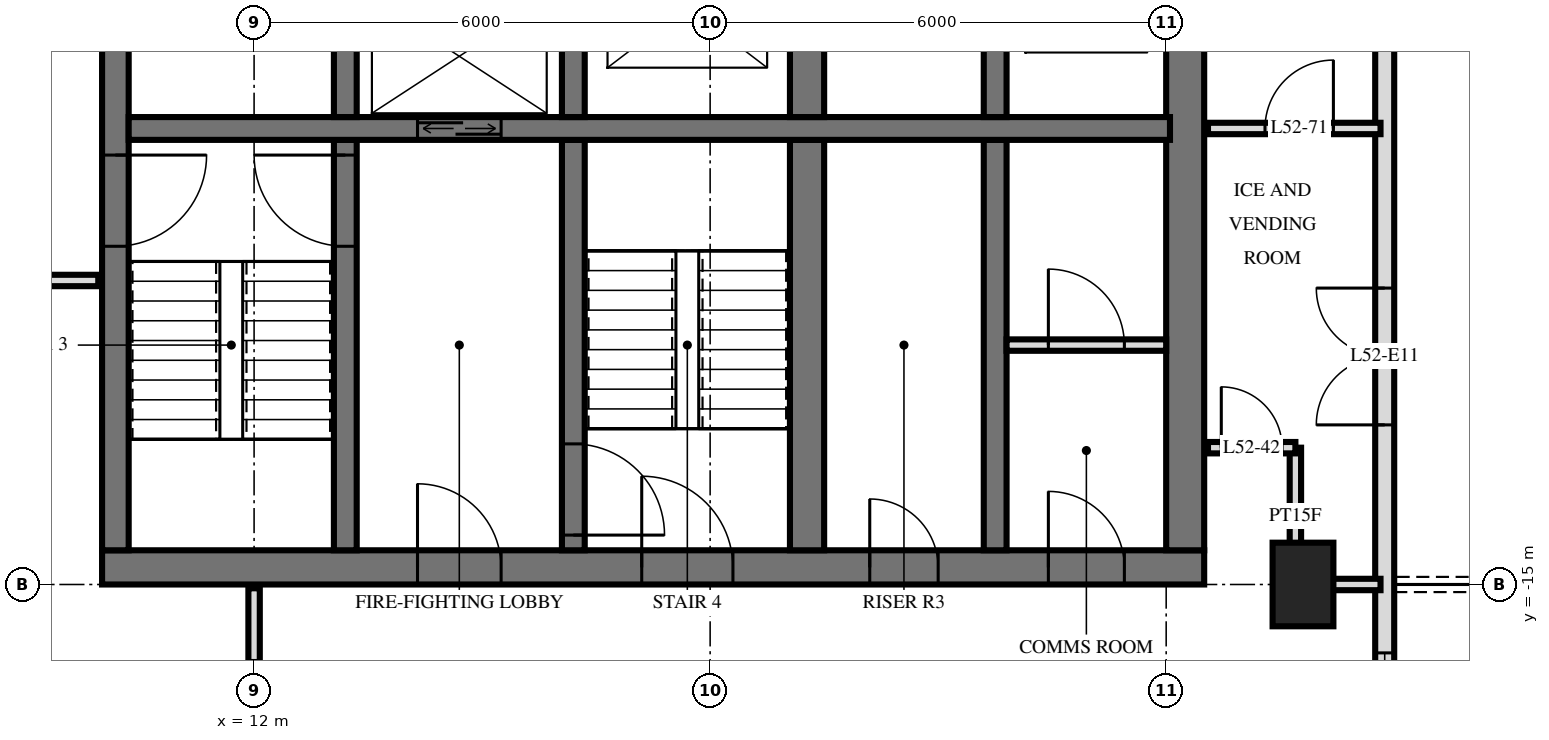
"""IFC4 building model, lengths in metres.
Left out: names, types, materials, properties, quantities, classifications, styles, units other than length and angle.
Written with IfcOpenShell. Run it as: python <this file> out.ifc"""

import sys

from ifc_helpers import new_model, si_unit, direction, frame, frame_2d, origin, origin_2d, place, context, subcontext, project, spatial, rectangle, extrude, element, fill, save


model = new_model("IFC4")
c1 = context("Model", 3, precision=1e-05, world=origin(), true_north=direction((0.0, 1.0)))
c2 = subcontext(c1, "Body", "Model", "MODEL_VIEW")
j1 = project(units=[si_unit("LENGTHUNIT", "METRE"), si_unit("PLANEANGLEUNIT", "RADIAN")], contexts=[c1])
p1 = place(None, origin())
s1 = spatial("IfcSite", under=j1, at=p1, CompositionType="ELEMENT")
p2 = place(p1, origin())
s2 = spatial("IfcBuilding", under=s1, at=p2, CompositionType="ELEMENT")
p3 = place(p2, frame((0.0, 0.0, 201.1)))
s3 = spatial("IfcBuildingStorey", under=s2, at=p3, CompositionType="ELEMENT", Elevation=201.1)
p4 = place(p3, frame((25.8, -15.0, 0.0), z_axis=(0.0, 0.0, 1.0), x_axis=(0.0, 1.0, 0.0)))
e1 = element("IfcColumn", 1, at=p4, inside=s3, PredefinedType="COLUMN", context=c2, shape_type="SweptSolid", body=[
    extrude(rectangle(XDim=1.1, YDim=0.8, at=origin_2d()), origin(), (0.0, 0.0, 1.0), 3.5),
])
p5 = place(p3, frame((10.0, -14.775, 0.0), z_axis=(0.0, 0.0, 1.0), x_axis=(1.0, 0.0, 0.0)))
e2 = element("IfcWall", 2, at=p5, inside=s3, PredefinedType="SHEAR", context=c2, shape_type="SweptSolid", body=[
    extrude(rectangle(XDim=14.5, YDim=0.45, at=frame_2d((7.25, 0.0))), origin(), (0.0, 0.0, 1.0), 3.5),
])
p6 = place(p5, frame((7.1, 0.0, 0.0)))
e3 = element("IfcOpeningElement", 3, at=p6, cuts=e2, PredefinedType="OPENING", context=c2, shape_type="SweptSolid", body=[
    extrude(rectangle(XDim=1.2, YDim=2.1, at=frame_2d((0.6, 1.05))), frame((0.0, 0.235, 0.0), z_axis=(0.0, -1.0, 0.0), x_axis=(1.0, 0.0, 0.0)), (0.0, 0.0, 1.0), 0.47),
])
p7 = place(p5, frame((4.15, 0.0, 0.0)))
e4 = element("IfcOpeningElement", 4, at=p7, cuts=e2, PredefinedType="OPENING", context=c2, shape_type="SweptSolid", body=[
    extrude(rectangle(XDim=1.1, YDim=2.1, at=frame_2d((0.55, 1.05))), frame((0.0, 0.235, 0.0), z_axis=(0.0, -1.0, 0.0), x_axis=(1.0, 0.0, 0.0)), (0.0, 0.0, 1.0), 0.47),
])
p8 = place(p5, frame((10.1, 0.0, 0.0)))
e5 = element("IfcOpeningElement", 5, at=p8, cuts=e2, PredefinedType="OPENING", context=c2, shape_type="SweptSolid", body=[
    extrude(rectangle(XDim=0.9, YDim=2.1, at=frame_2d((0.45, 1.05))), frame((0.0, 0.235, 0.0), z_axis=(0.0, -1.0, 0.0), x_axis=(1.0, 0.0, 0.0)), (0.0, 0.0, 1.0), 0.47),
])
p9 = place(p5, frame((12.45, 0.0, 0.0)))
e6 = element("IfcOpeningElement", 6, at=p9, cuts=e2, PredefinedType="OPENING", context=c2, shape_type="SweptSolid", body=[
    extrude(rectangle(XDim=1.0, YDim=2.1, at=frame_2d((0.5, 1.05))), frame((0.0, 0.235, 0.0), z_axis=(0.0, -1.0, 0.0), x_axis=(1.0, 0.0, 0.0)), (0.0, 0.0, 1.0), 0.47),
])
p10 = place(p3, frame((10.175, -14.55, 0.0), z_axis=(0.0, 0.0, 1.0), x_axis=(0.0, 1.0, 0.0)))
e7 = element("IfcWall", 7, at=p10, inside=s3, PredefinedType="SHEAR", context=c2, shape_type="SweptSolid", body=[
    extrude(rectangle(XDim=14.1, YDim=0.35, at=frame_2d((7.05, 0.0))), origin(), (0.0, 0.0, 1.0), 3.5),
])
p11 = place(p10, frame((8.4, 0.0, 0.0)))
e8 = element("IfcOpeningElement", 8, at=p11, cuts=e7, PredefinedType="OPENING", context=c2, shape_type="SweptSolid", body=[
    extrude(rectangle(XDim=1.4, YDim=2.4, at=frame_2d((0.7, 1.2))), frame((0.0, 0.185, 0.0), z_axis=(0.0, -1.0, 0.0), x_axis=(1.0, 0.0, 0.0)), (0.0, 0.0, 1.0), 0.37),
])
p12 = place(p10, frame((10.0, 0.0, 0.0)))
e9 = element("IfcOpeningElement", 9, at=p12, cuts=e7, PredefinedType="OPENING", context=c2, shape_type="SweptSolid", body=[
    extrude(rectangle(XDim=1.4, YDim=2.4, at=frame_2d((0.7, 1.2))), frame((0.0, 0.185, 0.0), z_axis=(0.0, -1.0, 0.0), x_axis=(1.0, 0.0, 0.0)), (0.0, 0.0, 1.0), 0.37),
])
p13 = place(p10, frame((4.0, 0.0, 0.0)))
e10 = element("IfcOpeningElement", 10, at=p13, cuts=e7, PredefinedType="OPENING", context=c2, shape_type="SweptSolid", body=[
    extrude(rectangle(XDim=1.2, YDim=2.1, at=frame_2d((0.6, 1.05))), frame((0.0, 0.185, 0.0), z_axis=(0.0, -1.0, 0.0), x_axis=(1.0, 0.0, 0.0)), (0.0, 0.0, 1.0), 0.37),
])
p14 = place(p3, frame((24.25, -14.55, 0.0), z_axis=(0.0, 0.0, 1.0), x_axis=(0.0, 1.0, 0.0)))
e11 = element("IfcWall", 11, at=p14, inside=s3, PredefinedType="SHEAR", context=c2, shape_type="SweptSolid", body=[
    extrude(rectangle(XDim=14.1, YDim=0.5, at=frame_2d((7.05, 0.0))), origin(), (0.0, 0.0, 1.0), 3.5),
])
p15 = place(p3, frame((10.35, -9.0, 0.0), z_axis=(0.0, 0.0, 1.0), x_axis=(1.0, 0.0, 0.0)))
e12 = element("IfcWall", 12, at=p15, inside=s3, PredefinedType="SHEAR", context=c2, shape_type="SweptSolid", body=[
    extrude(rectangle(XDim=13.7, YDim=0.3, at=frame_2d((6.85, 0.0))), origin(), (0.0, 0.0, 1.0), 3.5),
])
p16 = place(p15, frame((3.8, 0.0, 0.0)))
e13 = element("IfcOpeningElement", 13, at=p16, cuts=e12, PredefinedType="OPENING", context=c2, shape_type="SweptSolid", body=[
    extrude(rectangle(XDim=1.1, YDim=2.1, at=frame_2d((0.55, 1.05))), frame((0.0, 0.16, 0.0), z_axis=(0.0, -1.0, 0.0), x_axis=(1.0, 0.0, 0.0)), (0.0, 0.0, 1.0), 0.32),
])
p17 = place(p3, frame((13.2, -8.85, 0.0), z_axis=(0.0, 0.0, 1.0), x_axis=(0.0, 1.0, 0.0)))
e14 = element("IfcWall", 14, at=p17, inside=s3, PredefinedType="SHEAR", context=c2, shape_type="SweptSolid", body=[
    extrude(rectangle(XDim=2.3, YDim=0.3, at=frame_2d((1.15, 0.0))), origin(), (0.0, 0.0, 1.0), 3.5),
])
p18 = place(p3, frame((13.2, -14.55, 0.0), z_axis=(0.0, 0.0, 1.0), x_axis=(0.0, 1.0, 0.0)))
e15 = element("IfcWall", 15, at=p18, inside=s3, PredefinedType="SHEAR", context=c2, shape_type="SweptSolid", body=[
    extrude(rectangle(XDim=5.4, YDim=0.3, at=frame_2d((2.7, 0.0))), origin(), (0.0, 0.0, 1.0), 3.5),
])
p19 = place(p18, frame((4.0, 0.0, 0.0)))
e16 = element("IfcOpeningElement", 16, at=p19, cuts=e15, PredefinedType="OPENING", context=c2, shape_type="SweptSolid", body=[
    extrude(rectangle(XDim=1.2, YDim=2.1, at=frame_2d((0.6, 1.05))), frame((0.0, 0.16, 0.0), z_axis=(0.0, -1.0, 0.0), x_axis=(1.0, 0.0, 0.0)), (0.0, 0.0, 1.0), 0.32),
])
p20 = place(p3, frame((16.2, -8.85, 0.0), z_axis=(0.0, 0.0, 1.0), x_axis=(0.0, 1.0, 0.0)))
e17 = element("IfcWall", 17, at=p20, inside=s3, PredefinedType="SHEAR", context=c2, shape_type="SweptSolid", body=[
    extrude(rectangle(XDim=2.3, YDim=0.3, at=frame_2d((1.15, 0.0))), origin(), (0.0, 0.0, 1.0), 3.5),
])
p21 = place(p3, frame((16.2, -14.55, 0.0), z_axis=(0.0, 0.0, 1.0), x_axis=(0.0, 1.0, 0.0)))
e18 = element("IfcWall", 18, at=p21, inside=s3, PredefinedType="SHEAR", context=c2, shape_type="SweptSolid", body=[
    extrude(rectangle(XDim=5.4, YDim=0.3, at=frame_2d((2.7, 0.0))), origin(), (0.0, 0.0, 1.0), 3.5),
])
p22 = place(p21, frame((0.2, 0.0, 0.0)))
e19 = element("IfcOpeningElement", 19, at=p22, cuts=e18, PredefinedType="OPENING", context=c2, shape_type="SweptSolid", body=[
    extrude(rectangle(XDim=1.2, YDim=2.1, at=frame_2d((0.6, 1.05))), frame((0.0, 0.16, 0.0), z_axis=(0.0, -1.0, 0.0), x_axis=(1.0, 0.0, 0.0)), (0.0, 0.0, 1.0), 0.32),
])
p23 = place(p3, frame((19.275, -8.85, 0.0), z_axis=(0.0, 0.0, 1.0), x_axis=(0.0, 1.0, 0.0)))
e20 = element("IfcWall", 20, at=p23, inside=s3, PredefinedType="SHEAR", context=c2, shape_type="SweptSolid", body=[
    extrude(rectangle(XDim=2.3, YDim=0.45, at=frame_2d((1.15, 0.0))), origin(), (0.0, 0.0, 1.0), 3.5),
])
p24 = place(p3, frame((19.275, -14.55, 0.0), z_axis=(0.0, 0.0, 1.0), x_axis=(0.0, 1.0, 0.0)))
e21 = element("IfcWall", 21, at=p24, inside=s3, PredefinedType="SHEAR", context=c2, shape_type="SweptSolid", body=[
    extrude(rectangle(XDim=5.4, YDim=0.45, at=frame_2d((2.7, 0.0))), origin(), (0.0, 0.0, 1.0), 3.5),
])
p25 = place(p3, frame((21.75, -8.85, 0.0), z_axis=(0.0, 0.0, 1.0), x_axis=(0.0, 1.0, 0.0)))
e22 = element("IfcWall", 22, at=p25, inside=s3, PredefinedType="SHEAR", context=c2, shape_type="SweptSolid", body=[
    extrude(rectangle(XDim=2.3, YDim=0.3, at=frame_2d((1.15, 0.0))), origin(), (0.0, 0.0, 1.0), 3.5),
])
p26 = place(p3, frame((21.75, -14.55, 0.0), z_axis=(0.0, 0.0, 1.0), x_axis=(0.0, 1.0, 0.0)))
e23 = element("IfcWall", 23, at=p26, inside=s3, PredefinedType="SHEAR", context=c2, shape_type="SweptSolid", body=[
    extrude(rectangle(XDim=5.4, YDim=0.3, at=frame_2d((2.7, 0.0))), origin(), (0.0, 0.0, 1.0), 3.5),
])
p27 = place(p3, frame((26.875, -24.875, 0.0), z_axis=(0.0, 0.0, 1.0), x_axis=(0.0, 1.0, 0.0)))
e24 = element("IfcWall", 24, at=p27, inside=s3, PredefinedType="SOLIDWALL", context=c2, shape_type="SweptSolid", body=[
    extrude(rectangle(XDim=21.551, YDim=0.25, at=frame_2d((10.775, 0.0))), origin(), (0.0, 0.0, 1.0), 3.22),
])
p28 = place(p27, frame((0.425, 0.0, 0.0)))
e25 = element("IfcOpeningElement", 25, at=p28, cuts=e24, PredefinedType="OPENING", context=c2, shape_type="SweptSolid", body=[
    extrude(rectangle(XDim=1.8, YDim=2.4, at=frame_2d((0.9, 1.2))), frame((0.0, 0.135, 0.0), z_axis=(0.0, -1.0, 0.0), x_axis=(1.0, 0.0, 0.0)), (0.0, 0.0, 1.0), 0.27),
])
p29 = place(p27, frame((3.875, 0.0, 0.0)))
e26 = element("IfcOpeningElement", 26, at=p29, cuts=e24, PredefinedType="OPENING", context=c2, shape_type="SweptSolid", body=[
    extrude(rectangle(XDim=1.8, YDim=2.4, at=frame_2d((0.9, 1.2))), frame((0.0, 0.135, 0.0), z_axis=(0.0, -1.0, 0.0), x_axis=(1.0, 0.0, 0.0)), (0.0, 0.0, 1.0), 0.27),
])
p30 = place(p27, frame((7.775, 0.0, 0.9)))
e27 = element("IfcOpeningElement", 27, at=p30, cuts=e24, PredefinedType="OPENING", context=c2, shape_type="SweptSolid", body=[
    extrude(rectangle(XDim=1.2, YDim=1.5, at=frame_2d((0.6, 0.75))), frame((0.0, 0.135, 0.0), z_axis=(0.0, -1.0, 0.0), x_axis=(1.0, 0.0, 0.0)), (0.0, 0.0, 1.0), 0.27),
])
p31 = place(p27, frame((11.975, 0.0, 0.0)))
e28 = element("IfcOpeningElement", 28, at=p31, cuts=e24, PredefinedType="OPENING", context=c2, shape_type="SweptSolid", body=[
    extrude(rectangle(XDim=1.8, YDim=2.4, at=frame_2d((0.9, 1.2))), frame((0.0, 0.135, 0.0), z_axis=(0.0, -1.0, 0.0), x_axis=(1.0, 0.0, 0.0)), (0.0, 0.0, 1.0), 0.27),
])
p32 = place(p3, frame((21.9, -11.85, 0.0), z_axis=(0.0, 0.0, 1.0), x_axis=(1.0, 0.0, 0.0)))
e29 = element("IfcWall", 29, at=p32, inside=s3, PredefinedType="PARTITIONING", context=c2, shape_type="SweptSolid", body=[
    extrude(rectangle(XDim=2.1, YDim=0.15, at=frame_2d((1.05, 0.0))), origin(), (0.0, 0.0, 1.0), 3.2),
])
p33 = place(p32, frame((0.55, 0.0, 0.0)))
e30 = element("IfcOpeningElement", 30, at=p33, cuts=e29, PredefinedType="OPENING", context=c2, shape_type="SweptSolid", body=[
    extrude(rectangle(XDim=1.0, YDim=2.1, at=frame_2d((0.5, 1.05))), frame((0.0, 0.085, 0.0), z_axis=(0.0, -1.0, 0.0), x_axis=(1.0, 0.0, 0.0)), (0.0, 0.0, 1.0), 0.17),
])
p34 = place(p3, frame((25.7, -15.0, 0.0), z_axis=(0.0, 0.0, 1.0), x_axis=(0.0, 1.0, 0.0)))
e31 = element("IfcWall", 31, at=p34, inside=s3, PredefinedType="PARTITIONING", context=c2, shape_type="SweptSolid", body=[
    extrude(rectangle(XDim=1.8, YDim=0.15, at=frame_2d((0.9, 0.0))), origin(), (0.0, 0.0, 1.0), 3.22),
])
p35 = place(p3, frame((12.0, -18.0, 0.0), z_axis=(0.0, 0.0, 1.0), x_axis=(0.0, 1.0, 0.0)))
e32 = element("IfcWall", 32, at=p35, inside=s3, PredefinedType="PARTITIONING", context=c2, shape_type="SweptSolid", body=[
    extrude(rectangle(XDim=2.95, YDim=0.15, at=frame_2d((1.475, 0.0))), origin(), (0.0, 0.0, 1.0), 3.22),
])
p36 = place(p35, frame((1.0, 0.0, 0.0)))
e33 = element("IfcOpeningElement", 33, at=p36, cuts=e32, PredefinedType="OPENING", context=c2, shape_type="SweptSolid", body=[
    extrude(rectangle(XDim=1.0, YDim=2.1, at=frame_2d((0.5, 1.05))), frame((0.0, 0.085, 0.0), z_axis=(0.0, -1.0, 0.0), x_axis=(1.0, 0.0, 0.0)), (0.0, 0.0, 1.0), 0.17),
])
p37 = place(p3, frame((25.7, -15.0, 0.0), z_axis=(0.0, 0.0, 1.0), x_axis=(1.0, 0.0, 0.0)))
e34 = element("IfcWall", 34, at=p37, inside=s3, PredefinedType="PARTITIONING", context=c2, shape_type="SweptSolid", body=[
    extrude(rectangle(XDim=1.12, YDim=0.15, at=frame_2d((0.56, 0.0))), origin(), (0.0, 0.0, 1.0), 3.22),
])
p38 = place(p3, frame((24.55, -13.2, 0.0), z_axis=(0.0, 0.0, 1.0), x_axis=(1.0, 0.0, 0.0)))
e35 = element("IfcWall", 35, at=p38, inside=s3, PredefinedType="PARTITIONING", context=c2, shape_type="SweptSolid", body=[
    extrude(rectangle(XDim=1.15, YDim=0.15, at=frame_2d((0.575, 0.0))), origin(), (0.0, 0.0, 1.0), 3.22),
])
p39 = place(p38, frame((0.175, 0.0, 0.0)))
e36 = element("IfcOpeningElement", 36, at=p39, cuts=e35, PredefinedType="OPENING", context=c2, shape_type="SweptSolid", body=[
    extrude(rectangle(XDim=0.8, YDim=2.1, at=frame_2d((0.4, 1.05))), frame((0.0, 0.085, 0.0), z_axis=(0.0, -1.0, 0.0), x_axis=(1.0, 0.0, 0.0)), (0.0, 0.0, 1.0), 0.17),
])
p40 = place(p3, frame((-9.95, -11.0, 0.0), z_axis=(0.0, 0.0, 1.0), x_axis=(1.0, 0.0, 0.0)))
e37 = element("IfcWall", 37, at=p40, inside=s3, PredefinedType="PARTITIONING", context=c2, shape_type="SweptSolid", body=[
    extrude(rectangle(XDim=19.9, YDim=0.15, at=frame_2d((9.95, 0.0))), origin(), (0.0, 0.0, 1.0), 3.22),
])
p41 = place(p40, frame((9.45, 0.0, 0.0)))
e38 = element("IfcOpeningElement", 38, at=p41, cuts=e37, PredefinedType="OPENING", context=c2, shape_type="SweptSolid", body=[
    extrude(rectangle(XDim=1.0, YDim=2.1, at=frame_2d((0.5, 1.05))), frame((0.0, 0.085, 0.0), z_axis=(0.0, -1.0, 0.0), x_axis=(1.0, 0.0, 0.0)), (0.0, 0.0, 1.0), 0.17),
])
p42 = place(p40, frame((3.45, 0.0, 0.0)))
e39 = element("IfcOpeningElement", 39, at=p42, cuts=e37, PredefinedType="OPENING", context=c2, shape_type="SweptSolid", body=[
    extrude(rectangle(XDim=1.0, YDim=2.1, at=frame_2d((0.5, 1.05))), frame((0.0, 0.085, 0.0), z_axis=(0.0, -1.0, 0.0), x_axis=(1.0, 0.0, 0.0)), (0.0, 0.0, 1.0), 0.17),
])
p43 = place(p3, frame((24.55, -9.0, 0.0), z_axis=(0.0, 0.0, 1.0), x_axis=(1.0, 0.0, 0.0)))
e40 = element("IfcWall", 40, at=p43, inside=s3, PredefinedType="PARTITIONING", context=c2, shape_type="SweptSolid", body=[
    extrude(rectangle(XDim=2.27, YDim=0.15, at=frame_2d((1.135, 0.0))), origin(), (0.0, 0.0, 1.0), 3.22),
])
p44 = place(p43, frame((0.75, 0.0, 0.0)))
e41 = element("IfcOpeningElement", 41, at=p44, cuts=e40, PredefinedType="OPENING", context=c2, shape_type="SweptSolid", body=[
    extrude(rectangle(XDim=0.9, YDim=2.1, at=frame_2d((0.45, 1.05))), frame((0.0, 0.085, 0.0), z_axis=(0.0, -1.0, 0.0), x_axis=(1.0, 0.0, 0.0)), (0.0, 0.0, 1.0), 0.17),
])
p45 = place(p30, origin())
e42 = element("IfcWindow", 42, at=p45, inside=s3, PartitioningType="SINGLE_PANEL", PredefinedType="WINDOW", context=c2, shape_type="SweptSolid", body=[
    extrude(rectangle(XDim=1.2, YDim=1.5, at=frame_2d((0.6, 0.75))), frame((0.0, 0.03, 0.0), z_axis=(0.0, -1.0, 0.0), x_axis=(1.0, 0.0, 0.0)), (0.0, 0.0, 1.0), 0.06),
])
fill(e27, e42)
p46 = place(p31, origin())
e43 = element("IfcDoor", 43, at=p46, inside=s3, OperationType="DOUBLE_DOOR_SINGLE_SWING", PredefinedType="DOOR", context=c2, shape_type="SweptSolid", body=[
    extrude(rectangle(XDim=1.8, YDim=2.4, at=frame_2d((0.9, 1.2))), frame((0.0, 0.025, 0.0), z_axis=(0.0, -1.0, 0.0), x_axis=(1.0, 0.0, 0.0)), (0.0, 0.0, 1.0), 0.05),
])
fill(e28, e43)
p47 = place(p16, origin())
e44 = element("IfcDoor", 44, at=p47, inside=s3, OperationType="DOUBLE_DOOR_SLIDING", PredefinedType="USERDEFINED", context=c2, shape_type="SweptSolid", body=[
    extrude(rectangle(XDim=1.1, YDim=2.1, at=frame_2d((0.55, 1.05))), frame((0.0, 0.025, 0.0), z_axis=(0.0, -1.0, 0.0), x_axis=(1.0, 0.0, 0.0)), (0.0, 0.0, 1.0), 0.05),
])
fill(e13, e44)
p48 = place(p13, frame((0.6, 0.0, 0.0), z_axis=(0.0, 0.0, 1.0), x_axis=(-1.0, 0.0, 0.0)))
e45 = element("IfcDoor", 45, at=p48, inside=s3, OperationType="SINGLE_SWING_RIGHT", PredefinedType="DOOR", context=c2, shape_type="SweptSolid", body=[
    extrude(rectangle(XDim=1.2, YDim=2.1, at=frame_2d((0.0, 1.05))), frame((0.0, -0.025, 0.0), z_axis=(0.0, 1.0, 0.0), x_axis=(-1.0, 0.0, 0.0)), (0.0, 0.0, 1.0), 0.05),
])
fill(e10, e45)
p49 = place(p6, origin())
e46 = element("IfcDoor", 46, at=p49, inside=s3, OperationType="SINGLE_SWING_RIGHT", PredefinedType="DOOR", context=c2, shape_type="SweptSolid", body=[
    extrude(rectangle(XDim=1.2, YDim=2.1, at=frame_2d((0.6, 1.05))), frame((0.0, 0.025, 0.0), z_axis=(0.0, -1.0, 0.0), x_axis=(1.0, 0.0, 0.0)), (0.0, 0.0, 1.0), 0.05),
])
fill(e3, e46)
p50 = place(p7, origin())
e47 = element("IfcDoor", 47, at=p50, inside=s3, OperationType="SINGLE_SWING_RIGHT", PredefinedType="DOOR", context=c2, shape_type="SweptSolid", body=[
    extrude(rectangle(XDim=1.1, YDim=2.1, at=frame_2d((0.55, 1.05))), frame((0.0, 0.025, 0.0), z_axis=(0.0, -1.0, 0.0), x_axis=(1.0, 0.0, 0.0)), (0.0, 0.0, 1.0), 0.05),
])
fill(e4, e47)
p51 = place(p8, origin())
e48 = element("IfcDoor", 48, at=p51, inside=s3, OperationType="SINGLE_SWING_RIGHT", PredefinedType="DOOR", context=c2, shape_type="SweptSolid", body=[
    extrude(rectangle(XDim=0.9, YDim=2.1, at=frame_2d((0.45, 1.05))), frame((0.0, 0.025, 0.0), z_axis=(0.0, -1.0, 0.0), x_axis=(1.0, 0.0, 0.0)), (0.0, 0.0, 1.0), 0.05),
])
fill(e5, e48)
p52 = place(p9, origin())
e49 = element("IfcDoor", 49, at=p52, inside=s3, OperationType="SINGLE_SWING_RIGHT", PredefinedType="DOOR", context=c2, shape_type="SweptSolid", body=[
    extrude(rectangle(XDim=1.0, YDim=2.1, at=frame_2d((0.5, 1.05))), frame((0.0, 0.025, 0.0), z_axis=(0.0, -1.0, 0.0), x_axis=(1.0, 0.0, 0.0)), (0.0, 0.0, 1.0), 0.05),
])
fill(e6, e49)
p53 = place(p19, origin())
e50 = element("IfcDoor", 50, at=p53, inside=s3, OperationType="SINGLE_SWING_LEFT", PredefinedType="DOOR", context=c2, shape_type="SweptSolid", body=[
    extrude(rectangle(XDim=1.2, YDim=2.1, at=frame_2d((0.6, 1.05))), frame((0.0, 0.025, 0.0), z_axis=(0.0, -1.0, 0.0), x_axis=(1.0, 0.0, 0.0)), (0.0, 0.0, 1.0), 0.05),
])
fill(e16, e50)
p54 = place(p22, frame((0.6, 0.0, 0.0), z_axis=(0.0, 0.0, 1.0), x_axis=(-1.0, 0.0, 0.0)))
e51 = element("IfcDoor", 51, at=p54, inside=s3, OperationType="SINGLE_SWING_LEFT", PredefinedType="DOOR", context=c2, shape_type="SweptSolid", body=[
    extrude(rectangle(XDim=1.2, YDim=2.1, at=frame_2d((0.0, 1.05))), frame((0.0, -0.025, 0.0), z_axis=(0.0, 1.0, 0.0), x_axis=(-1.0, 0.0, 0.0)), (0.0, 0.0, 1.0), 0.05),
])
fill(e19, e51)
p55 = place(p33, origin())
e52 = element("IfcDoor", 52, at=p55, inside=s3, OperationType="SINGLE_SWING_RIGHT", PredefinedType="DOOR", context=c2, shape_type="SweptSolid", body=[
    extrude(rectangle(XDim=1.0, YDim=2.1, at=frame_2d((0.5, 1.05))), frame((0.0, 0.025, 0.0), z_axis=(0.0, -1.0, 0.0), x_axis=(1.0, 0.0, 0.0)), (0.0, 0.0, 1.0), 0.05),
])
fill(e30, e52)
p56 = place(p39, origin())
e53 = element("IfcDoor", 53, at=p56, inside=s3, OperationType="SINGLE_SWING_RIGHT", PredefinedType="DOOR", context=c2, shape_type="SweptSolid", body=[
    extrude(rectangle(XDim=0.8, YDim=2.1, at=frame_2d((0.4, 1.05))), frame((0.0, 0.025, 0.0), z_axis=(0.0, -1.0, 0.0), x_axis=(1.0, 0.0, 0.0)), (0.0, 0.0, 1.0), 0.05),
])
fill(e36, e53)
p57 = place(p44, origin())
e54 = element("IfcDoor", 54, at=p57, inside=s3, OperationType="SINGLE_SWING_LEFT", PredefinedType="DOOR", context=c2, shape_type="SweptSolid", body=[
    extrude(rectangle(XDim=0.9, YDim=2.1, at=frame_2d((0.45, 1.05))), frame((0.0, 0.025, 0.0), z_axis=(0.0, -1.0, 0.0), x_axis=(1.0, 0.0, 0.0)), (0.0, 0.0, 1.0), 0.05),
])
fill(e41, e54)
save(model, sys.argv[1])
